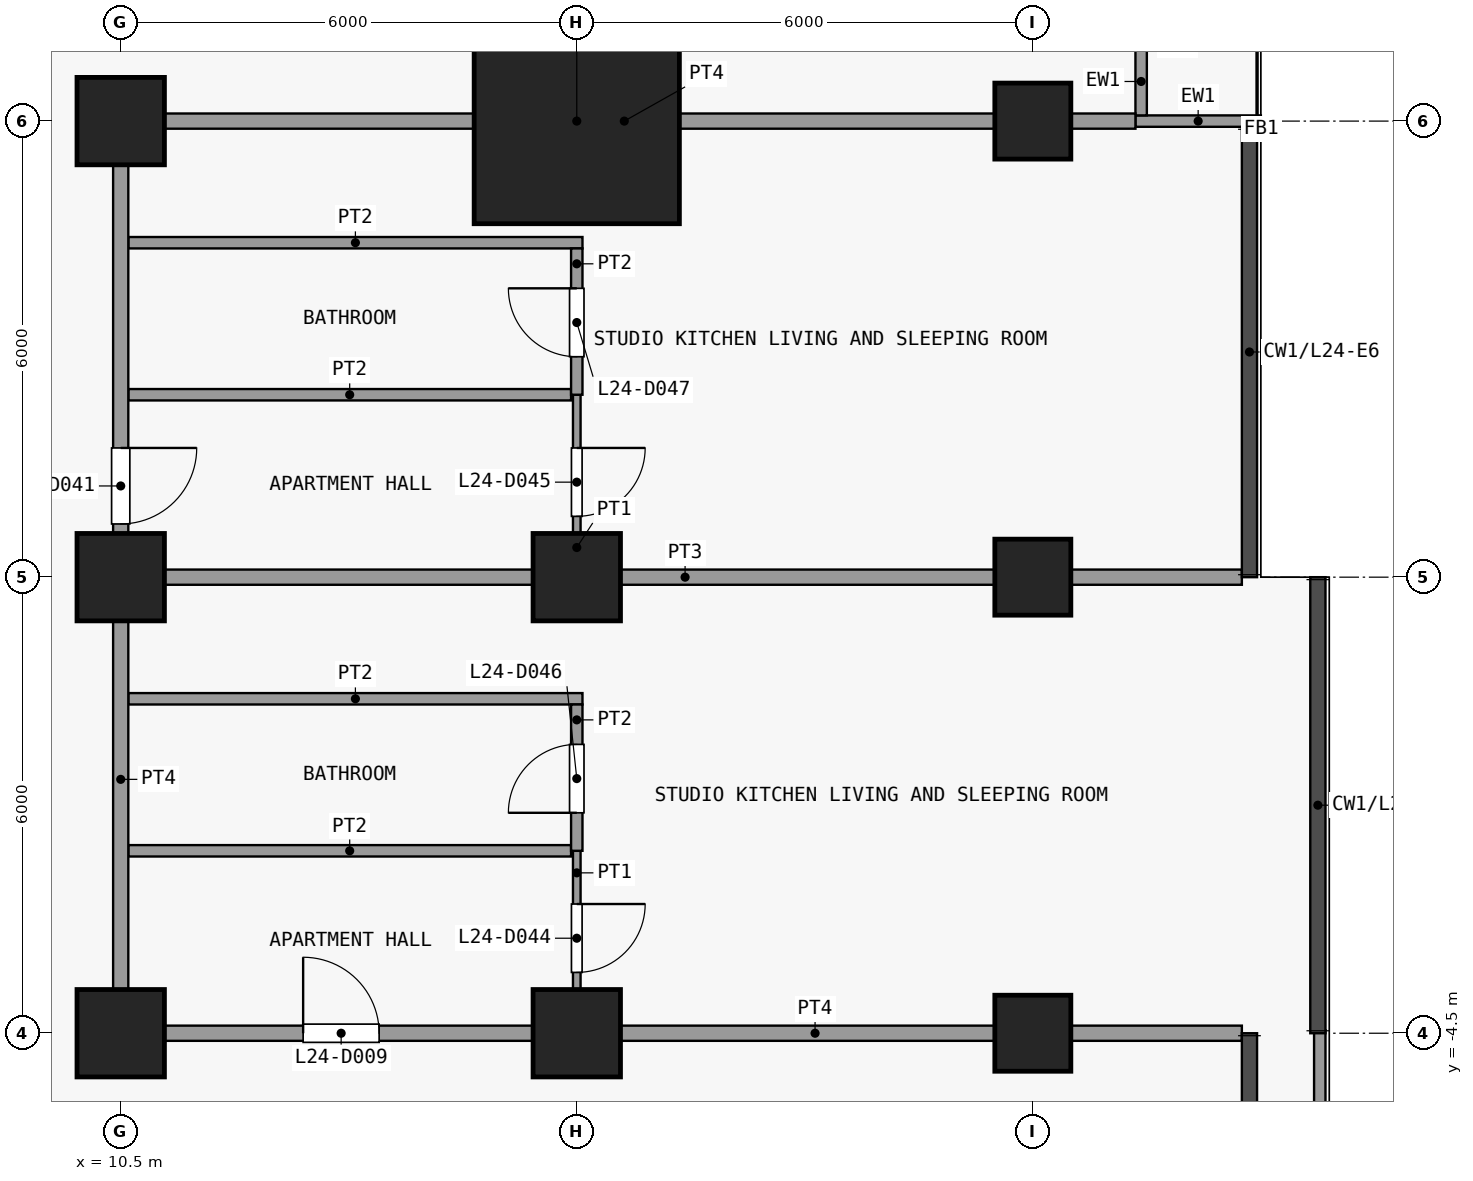
"""IFC4 building model, lengths in metres.
Left out: names, types, materials, properties, quantities, classifications, styles, units other than length and angle.
Written with IfcOpenShell. Run it as: python <this file> out.ifc"""

import sys

from ifc_helpers import new_model, si_unit, direction, frame, frame_2d, origin, origin_2d, place, context, subcontext, project, spatial, rectangle, extrude, element, fill, save


model = new_model("IFC4")
c1 = context("Model", 3, precision=1e-05, world=origin(), true_north=direction((0.0, 1.0)))
c2 = subcontext(c1, "Body", "Model", "MODEL_VIEW")
j1 = project(units=[si_unit("LENGTHUNIT", "METRE"), si_unit("PLANEANGLEUNIT", "RADIAN")], contexts=[c1])
p1 = place(None, origin())
s1 = spatial("IfcSite", under=j1, at=p1, CompositionType="ELEMENT")
p2 = place(p1, origin())
s2 = spatial("IfcBuilding", under=s1, at=p2, CompositionType="ELEMENT")
p3 = place(p2, frame((0.0, 0.0, 99.1)))
s3 = spatial("IfcBuildingStorey", under=s2, at=p3, CompositionType="ELEMENT", Elevation=99.1)
for number, where, z_axis, x_axis in (
    (1, (10.5, -4.5, 0.0), (0.0, 0.0, 1.0), (1.0, 0.0, 0.0)),
    (2, (10.5, 1.5, 0.0), (0.0, 0.0, 1.0), (1.0, 0.0, 0.0)),
    (3, (10.5, 7.5, 0.0), (0.0, 0.0, 1.0), (1.0, 0.0, 0.0)),
    (4, (16.5, -4.5, 0.0), (0.0, 0.0, 1.0), (1.0, 0.0, 0.0)),
    (5, (16.5, 1.5, 0.0), (0.0, 0.0, 1.0), (1.0, 0.0, 0.0)),
):
    element("IfcColumn", number, at=place(p3, frame(where, z_axis=z_axis, x_axis=x_axis)), inside=s3, PredefinedType="COLUMN", context=c2, shape_type="SweptSolid", body=[
        extrude(rectangle(XDim=1.15, YDim=1.15, at=origin_2d()), origin(), (0.0, 0.0, 1.0), 3.6),
    ])
p4 = place(p3, frame((16.5, 7.5, 0.0), z_axis=(0.0, 0.0, 1.0), x_axis=(1.0, 0.0, 0.0)))
e6 = element("IfcColumn", 6, at=p4, inside=s3, PredefinedType="COLUMN", context=c2, shape_type="SweptSolid", body=[
    extrude(rectangle(XDim=2.7, YDim=2.7, at=origin_2d()), origin(), (0.0, 0.0, 1.0), 3.6),
])
for number, where, z_axis, x_axis in (
    (7, (22.5, -4.5, 0.0), (0.0, 0.0, 1.0), (1.0, 0.0, 0.0)),
    (8, (22.5, 1.5, 0.0), (0.0, 0.0, 1.0), (1.0, 0.0, 0.0)),
    (9, (22.5, 7.5, 0.0), (0.0, 0.0, 1.0), (1.0, 0.0, 0.0)),
):
    element("IfcColumn", number, at=place(p3, frame(where, z_axis=z_axis, x_axis=x_axis)), inside=s3, PredefinedType="COLUMN", context=c2, shape_type="SweptSolid", body=[
        extrude(rectangle(XDim=1.0, YDim=1.0, at=origin_2d()), origin(), (0.0, 0.0, 1.0), 3.6),
    ])
p5 = place(p3, frame((23.85, 7.5, 0.0), z_axis=(0.0, 0.0, 1.0), x_axis=(1.0, 0.0, 0.0)))
e10 = element("IfcWall", 10, at=p5, inside=s3, PredefinedType="SOLIDWALL", context=c2, shape_type="SweptSolid", body=[
    extrude(rectangle(XDim=1.65, YDim=0.15, at=frame_2d((0.825, 0.0))), origin(), (0.0, 0.0, 1.0), 3.3),
])
p6 = place(p3, frame((23.925, 13.425, 0.0), z_axis=(0.0, 0.0, 1.0), x_axis=(0.0, -1.0, 0.0)))
e11 = element("IfcWall", 11, at=p6, inside=s3, PredefinedType="SOLIDWALL", context=c2, shape_type="SweptSolid", body=[
    extrude(rectangle(XDim=5.85, YDim=0.15, at=frame_2d((2.925, 0.0))), origin(), (0.0, 0.0, 1.0), 3.3),
])
p7 = place(p6, frame((0.825, 0.0, 0.0)))
e12 = element("IfcOpeningElement", 12, at=p7, cuts=e11, PredefinedType="OPENING", context=c2, shape_type="SweptSolid", body=[
    extrude(rectangle(XDim=1.2, YDim=2.4, at=frame_2d((0.6, 1.2))), frame((0.0, 0.085, 0.0), z_axis=(0.0, -1.0, 0.0), x_axis=(1.0, 0.0, 0.0)), (0.0, 0.0, 1.0), 0.17),
])
p8 = place(p6, frame((3.038, 0.0, 0.9)))
e13 = element("IfcOpeningElement", 13, at=p8, cuts=e11, PredefinedType="OPENING", context=c2, shape_type="SweptSolid", body=[
    extrude(rectangle(XDim=1.8, YDim=2.1, at=frame_2d((0.9, 1.05))), frame((0.0, 0.085, 0.0), z_axis=(0.0, -1.0, 0.0), x_axis=(1.0, 0.0, 0.0)), (0.0, 0.0, 1.0), 0.17),
])
p9 = place(p3, frame((26.275, -4.46, 0.0), z_axis=(0.0, 0.0, 1.0), x_axis=(0.0, -1.0, 0.0)))
e14 = element("IfcWall", 14, at=p9, inside=s3, PredefinedType="PARAPET", context=c2, shape_type="SweptSolid", body=[
    extrude(rectangle(XDim=8.99, YDim=0.15, at=frame_2d((4.495, 0.0))), origin(), (0.0, 0.0, 1.0), 1.15),
])
p10 = place(p3, frame((10.4, -4.5, 0.0), z_axis=(0.0, 0.0, 1.0), x_axis=(1.0, 0.0, 0.0)))
e15 = element("IfcWall", 15, at=p10, inside=s3, PredefinedType="PARTITIONING", context=c2, shape_type="SweptSolid", body=[
    extrude(rectangle(XDim=14.85, YDim=0.2, at=frame_2d((7.425, 0.0))), origin(), (0.0, 0.0, 1.0), 3.3),
])
p11 = place(p10, frame((2.5, 0.0, 0.0)))
e16 = element("IfcOpeningElement", 16, at=p11, cuts=e15, PredefinedType="OPENING", context=c2, shape_type="SweptSolid", body=[
    extrude(rectangle(XDim=1.0, YDim=2.1, at=frame_2d((0.5, 1.05))), frame((0.0, 0.11, 0.0), z_axis=(0.0, -1.0, 0.0), x_axis=(1.0, 0.0, 0.0)), (0.0, 0.0, 1.0), 0.22),
])
p12 = place(p3, frame((10.6, -2.1, 0.0), z_axis=(0.0, 0.0, 1.0), x_axis=(1.0, 0.0, 0.0)))
e17 = element("IfcWall", 17, at=p12, inside=s3, PredefinedType="PARTITIONING", context=c2, shape_type="SweptSolid", body=[
    extrude(rectangle(XDim=5.825, YDim=0.15, at=frame_2d((2.913, 0.0))), origin(), (0.0, 0.0, 1.0), 3.3),
])
p13 = place(p3, frame((10.6, -0.1, 0.0), z_axis=(0.0, 0.0, 1.0), x_axis=(1.0, 0.0, 0.0)))
e18 = element("IfcWall", 18, at=p13, inside=s3, PredefinedType="PARTITIONING", context=c2, shape_type="SweptSolid", body=[
    extrude(rectangle(XDim=5.975, YDim=0.15, at=frame_2d((2.987, 0.0))), origin(), (0.0, 0.0, 1.0), 3.3),
])
p14 = place(p3, frame((10.6, 1.5, 0.0), z_axis=(0.0, 0.0, 1.0), x_axis=(1.0, 0.0, 0.0)))
e19 = element("IfcWall", 19, at=p14, inside=s3, PredefinedType="PARTITIONING", context=c2, shape_type="SweptSolid", body=[
    extrude(rectangle(XDim=14.65, YDim=0.2, at=frame_2d((7.325, 0.0))), origin(), (0.0, 0.0, 1.0), 3.3),
])
p15 = place(p3, frame((10.6, 3.9, 0.0), z_axis=(0.0, 0.0, 1.0), x_axis=(1.0, 0.0, 0.0)))
e20 = element("IfcWall", 20, at=p15, inside=s3, PredefinedType="PARTITIONING", context=c2, shape_type="SweptSolid", body=[
    extrude(rectangle(XDim=5.825, YDim=0.15, at=frame_2d((2.913, 0.0))), origin(), (0.0, 0.0, 1.0), 3.3),
])
p16 = place(p3, frame((10.6, 5.9, 0.0), z_axis=(0.0, 0.0, 1.0), x_axis=(1.0, 0.0, 0.0)))
e21 = element("IfcWall", 21, at=p16, inside=s3, PredefinedType="PARTITIONING", context=c2, shape_type="SweptSolid", body=[
    extrude(rectangle(XDim=5.975, YDim=0.15, at=frame_2d((2.987, 0.0))), origin(), (0.0, 0.0, 1.0), 3.3),
])
p17 = place(p3, frame((10.4, 7.5, 0.0), z_axis=(0.0, 0.0, 1.0), x_axis=(1.0, 0.0, 0.0)))
e22 = element("IfcWall", 22, at=p17, inside=s3, PredefinedType="PARTITIONING", context=c2, shape_type="SweptSolid", body=[
    extrude(rectangle(XDim=13.45, YDim=0.2, at=frame_2d((6.725, 0.0))), origin(), (0.0, 0.0, 1.0), 3.3),
])
p18 = place(p3, frame((10.5, -4.4, 0.0), z_axis=(0.0, 0.0, 1.0), x_axis=(0.0, 1.0, 0.0)))
e23 = element("IfcWall", 23, at=p18, inside=s3, PredefinedType="PARTITIONING", context=c2, shape_type="SweptSolid", body=[
    extrude(rectangle(XDim=11.8, YDim=0.2, at=frame_2d((5.9, 0.0))), origin(), (0.0, 0.0, 1.0), 3.3),
])
p19 = place(p18, frame((6.6, 0.0, 0.0)))
e24 = element("IfcOpeningElement", 24, at=p19, cuts=e23, PredefinedType="OPENING", context=c2, shape_type="SweptSolid", body=[
    extrude(rectangle(XDim=1.0, YDim=2.1, at=frame_2d((0.5, 1.05))), frame((0.0, 0.11, 0.0), z_axis=(0.0, -1.0, 0.0), x_axis=(1.0, 0.0, 0.0)), (0.0, 0.0, 1.0), 0.22),
])
p20 = place(p3, frame((16.5, -4.4, 0.0), z_axis=(0.0, 0.0, 1.0), x_axis=(0.0, 1.0, 0.0)))
e25 = element("IfcWall", 25, at=p20, inside=s3, PredefinedType="PARTITIONING", context=c2, shape_type="SweptSolid", body=[
    extrude(rectangle(XDim=2.3, YDim=0.1, at=frame_2d((1.15, 0.0))), origin(), (0.0, 0.0, 1.0), 3.3),
])
p21 = place(p20, frame((0.7, 0.0, 0.0)))
e26 = element("IfcOpeningElement", 26, at=p21, cuts=e25, PredefinedType="OPENING", context=c2, shape_type="SweptSolid", body=[
    extrude(rectangle(XDim=0.9, YDim=2.1, at=frame_2d((0.45, 1.05))), frame((0.0, 0.06, 0.0), z_axis=(0.0, -1.0, 0.0), x_axis=(1.0, 0.0, 0.0)), (0.0, 0.0, 1.0), 0.12),
])
p22 = place(p3, frame((16.5, 1.6, 0.0), z_axis=(0.0, 0.0, 1.0), x_axis=(0.0, 1.0, 0.0)))
e27 = element("IfcWall", 27, at=p22, inside=s3, PredefinedType="PARTITIONING", context=c2, shape_type="SweptSolid", body=[
    extrude(rectangle(XDim=2.3, YDim=0.1, at=frame_2d((1.15, 0.0))), origin(), (0.0, 0.0, 1.0), 3.3),
])
p23 = place(p22, frame((0.7, 0.0, 0.0)))
e28 = element("IfcOpeningElement", 28, at=p23, cuts=e27, PredefinedType="OPENING", context=c2, shape_type="SweptSolid", body=[
    extrude(rectangle(XDim=0.9, YDim=2.1, at=frame_2d((0.45, 1.05))), frame((0.0, 0.06, 0.0), z_axis=(0.0, -1.0, 0.0), x_axis=(1.0, 0.0, 0.0)), (0.0, 0.0, 1.0), 0.12),
])
p24 = place(p3, frame((16.5, -2.1, 0.0), z_axis=(0.0, 0.0, 1.0), x_axis=(0.0, 1.0, 0.0)))
e29 = element("IfcWall", 29, at=p24, inside=s3, PredefinedType="PARTITIONING", context=c2, shape_type="SweptSolid", body=[
    extrude(rectangle(XDim=1.925, YDim=0.15, at=frame_2d((0.962, 0.0))), origin(), (0.0, 0.0, 1.0), 3.3),
])
p25 = place(p24, frame((0.5, 0.0, 0.0)))
e30 = element("IfcOpeningElement", 30, at=p25, cuts=e29, PredefinedType="OPENING", context=c2, shape_type="SweptSolid", body=[
    extrude(rectangle(XDim=0.9, YDim=2.1, at=frame_2d((0.45, 1.05))), frame((0.0, 0.085, 0.0), z_axis=(0.0, -1.0, 0.0), x_axis=(1.0, 0.0, 0.0)), (0.0, 0.0, 1.0), 0.17),
])
p26 = place(p3, frame((16.5, 3.9, 0.0), z_axis=(0.0, 0.0, 1.0), x_axis=(0.0, 1.0, 0.0)))
e31 = element("IfcWall", 31, at=p26, inside=s3, PredefinedType="PARTITIONING", context=c2, shape_type="SweptSolid", body=[
    extrude(rectangle(XDim=1.925, YDim=0.15, at=frame_2d((0.962, 0.0))), origin(), (0.0, 0.0, 1.0), 3.3),
])
p27 = place(p26, frame((0.5, 0.0, 0.0)))
e32 = element("IfcOpeningElement", 32, at=p27, cuts=e31, PredefinedType="OPENING", context=c2, shape_type="SweptSolid", body=[
    extrude(rectangle(XDim=0.9, YDim=2.1, at=frame_2d((0.45, 1.05))), frame((0.0, 0.085, 0.0), z_axis=(0.0, -1.0, 0.0), x_axis=(1.0, 0.0, 0.0)), (0.0, 0.0, 1.0), 0.17),
])
p28 = place(p11, origin())
e33 = element("IfcDoor", 33, at=p28, inside=s3, OperationType="SINGLE_SWING_RIGHT", PredefinedType="DOOR", context=c2, shape_type="SweptSolid", body=[
    extrude(rectangle(XDim=1.0, YDim=2.1, at=frame_2d((0.5, 1.05))), frame((0.0, 0.025, 0.0), z_axis=(0.0, -1.0, 0.0), x_axis=(1.0, 0.0, 0.0)), (0.0, 0.0, 1.0), 0.05),
])
fill(e16, e33)
p29 = place(p19, origin())
e34 = element("IfcDoor", 34, at=p29, inside=s3, OperationType="SINGLE_SWING_RIGHT", PredefinedType="DOOR", context=c2, shape_type="SweptSolid", body=[
    extrude(rectangle(XDim=1.0, YDim=2.1, at=frame_2d((0.5, 1.05))), frame((0.0, 0.025, 0.0), z_axis=(0.0, -1.0, 0.0), x_axis=(1.0, 0.0, 0.0)), (0.0, 0.0, 1.0), 0.05),
])
fill(e24, e34)
p30 = place(p21, origin())
e35 = element("IfcDoor", 35, at=p30, inside=s3, OperationType="SINGLE_SWING_RIGHT", PredefinedType="DOOR", context=c2, shape_type="SweptSolid", body=[
    extrude(rectangle(XDim=0.9, YDim=2.1, at=frame_2d((0.45, 1.05))), frame((0.0, 0.025, 0.0), z_axis=(0.0, -1.0, 0.0), x_axis=(1.0, 0.0, 0.0)), (0.0, 0.0, 1.0), 0.05),
])
fill(e26, e35)
p31 = place(p23, origin())
e36 = element("IfcDoor", 36, at=p31, inside=s3, OperationType="SINGLE_SWING_RIGHT", PredefinedType="DOOR", context=c2, shape_type="SweptSolid", body=[
    extrude(rectangle(XDim=0.9, YDim=2.1, at=frame_2d((0.45, 1.05))), frame((0.0, 0.025, 0.0), z_axis=(0.0, -1.0, 0.0), x_axis=(1.0, 0.0, 0.0)), (0.0, 0.0, 1.0), 0.05),
])
fill(e28, e36)
p32 = place(p25, origin())
e37 = element("IfcDoor", 37, at=p32, inside=s3, OperationType="SINGLE_SWING_RIGHT", PredefinedType="DOOR", context=c2, shape_type="SweptSolid", body=[
    extrude(rectangle(XDim=0.9, YDim=2.1, at=frame_2d((0.45, 1.05))), frame((0.0, 0.025, 0.0), z_axis=(0.0, -1.0, 0.0), x_axis=(1.0, 0.0, 0.0)), (0.0, 0.0, 1.0), 0.05),
])
fill(e30, e37)
p33 = place(p27, origin())
e38 = element("IfcDoor", 38, at=p33, inside=s3, OperationType="SINGLE_SWING_LEFT", PredefinedType="DOOR", context=c2, shape_type="SweptSolid", body=[
    extrude(rectangle(XDim=0.9, YDim=2.1, at=frame_2d((0.45, 1.05))), frame((0.0, 0.025, 0.0), z_axis=(0.0, -1.0, 0.0), x_axis=(1.0, 0.0, 0.0)), (0.0, 0.0, 1.0), 0.05),
])
fill(e32, e38)
save(model, sys.argv[1])
